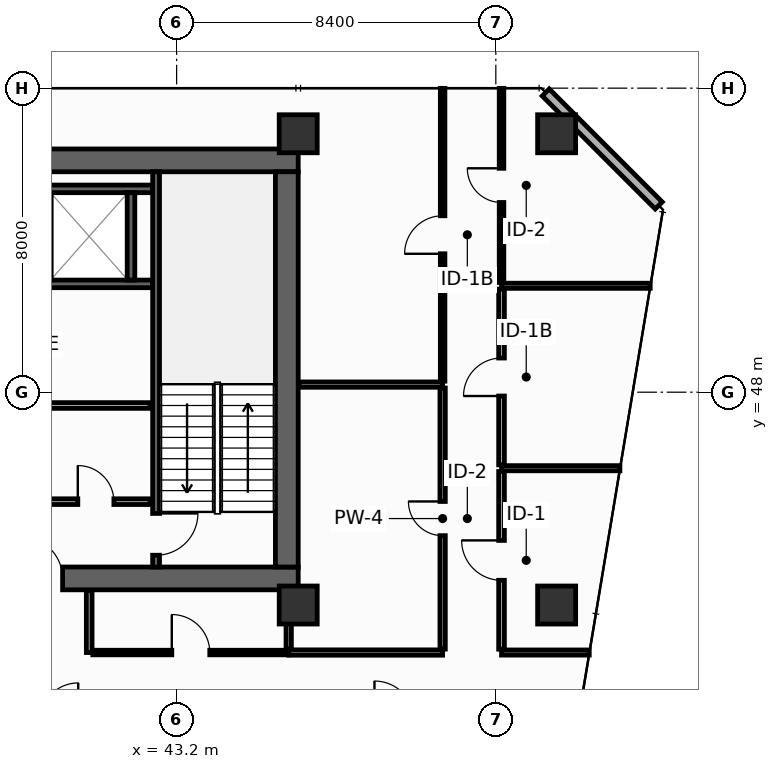
"""IFC4 building model, lengths in metres.
Left out: names, types, materials, properties, quantities, classifications, styles, units other than length and angle.
Written with IfcOpenShell. Run it as: python <this file> out.ifc"""

import sys

from ifc_helpers import new_model, si_unit, direction, frame, frame_2d, origin, origin_2d, place, context, subcontext, project, spatial, rectangle, hollow_rectangle, extrude, element, fill, save


model = new_model("IFC4")
c1 = context("Model", 3, precision=1e-05, world=origin(), true_north=direction((0.0, 1.0)))
c2 = subcontext(c1, "Body", "Model", "MODEL_VIEW")
j1 = project(units=[si_unit("LENGTHUNIT", "METRE"), si_unit("PLANEANGLEUNIT", "RADIAN")], contexts=[c1])
p1 = place(None, origin())
s1 = spatial("IfcSite", under=j1, at=p1, CompositionType="ELEMENT")
p2 = place(p1, origin())
s2 = spatial("IfcBuilding", under=s1, at=p2, CompositionType="ELEMENT")
p3 = place(p2, frame((0.0, 0.0, 110.4)))
s3 = spatial("IfcBuildingStorey", under=s2, at=p3, CompositionType="ELEMENT", Elevation=110.4)
p4 = place(p3, frame((13.5, 43.1, 0.0), z_axis=(0.0, 0.0, 1.0), x_axis=(1.0, 0.0, 0.0)))
e1 = element("IfcWall", 1, at=p4, inside=s3, PredefinedType="SHEAR", context=c2, shape_type="SweptSolid", body=[
    extrude(rectangle(XDim=32.9, YDim=0.6, at=frame_2d((16.45, 0.0))), origin(), (0.0, 0.0, 1.0), 4.15),
])
p5 = place(p4, frame((5.4, 0.0, 0.0)))
e2 = element("IfcOpeningElement", 2, at=p5, cuts=e1, PredefinedType="OPENING", context=c2, shape_type="SweptSolid", body=[
    extrude(rectangle(XDim=1.1, YDim=2.15, at=frame_2d((0.55, 1.075))), frame((0.0, 0.31, 0.0), z_axis=(0.0, -1.0, 0.0), x_axis=(1.0, 0.0, 0.0)), (0.0, 0.0, 1.0), 0.62),
])
p6 = place(p4, frame((25.6, 0.0, 0.0)))
e3 = element("IfcOpeningElement", 3, at=p6, cuts=e1, PredefinedType="OPENING", context=c2, shape_type="SweptSolid", body=[
    extrude(rectangle(XDim=1.1, YDim=2.15, at=frame_2d((0.55, 1.075))), frame((0.0, 0.31, 0.0), z_axis=(0.0, -1.0, 0.0), x_axis=(1.0, 0.0, 0.0)), (0.0, 0.0, 1.0), 0.62),
])
p7 = place(p3, frame((13.5, 54.1, 0.0), z_axis=(0.0, 0.0, 1.0), x_axis=(1.0, 0.0, 0.0)))
e4 = element("IfcWall", 4, at=p7, inside=s3, PredefinedType="SHEAR", context=c2, shape_type="SweptSolid", body=[
    extrude(rectangle(XDim=32.9, YDim=0.6, at=frame_2d((16.45, 0.0))), origin(), (0.0, 0.0, 1.0), 4.15),
])
p8 = place(p3, frame((46.1, 43.4, 0.0), z_axis=(0.0, 0.0, 1.0), x_axis=(0.0, 1.0, 0.0)))
e5 = element("IfcWall", 5, at=p8, inside=s3, PredefinedType="SHEAR", context=c2, shape_type="SweptSolid", body=[
    extrude(rectangle(XDim=10.4, YDim=0.6, at=frame_2d((5.2, 0.0))), origin(), (0.0, 0.0, 1.0), 4.15),
])
for number, where, z_axis, x_axis in (
    (6, (46.4, 54.8, 0.0), (0.0, 0.0, 1.0), (1.0, 0.0, 0.0)),
    (7, (53.2, 54.8, 0.0), (0.0, 0.0, 1.0), (1.0, 0.0, 0.0)),
    (8, (46.4, 42.4, 0.0), (0.0, 0.0, 1.0), (1.0, 0.0, 0.0)),
    (9, (53.2, 42.4, 0.0), (0.0, 0.0, 1.0), (1.0, 0.0, 0.0)),
):
    element("IfcColumn", number, at=place(p3, frame(where, z_axis=z_axis, x_axis=x_axis)), inside=s3, PredefinedType="COLUMN", context=c2, shape_type="SweptSolid", body=[
        extrude(hollow_rectangle(XDim=1.0, YDim=1.0, WallThickness=0.045, at=origin_2d()), origin(), (0.0, 0.0, 1.0), 4.4),
    ])
for number, where, z_axis, x_axis in (
    (10, (39.525, 50.85, 0.0), (0.0, 0.0, 1.0), (1.0, 0.0, 0.0)),
    (11, (39.525, 53.35, 0.0), (0.0, 0.0, 1.0), (1.0, 0.0, 0.0)),
):
    element("IfcWall", number, at=place(p3, frame(where, z_axis=z_axis, x_axis=x_axis)), inside=s3, PredefinedType="SHEAR", context=c2, shape_type="SweptSolid", body=[
        extrude(rectangle(XDim=3.045, YDim=0.2, at=frame_2d((1.522, 0.0))), origin(), (0.0, 0.0, 1.0), 4.15),
    ])
p9 = place(p3, frame((42.0, 50.95, 0.0), z_axis=(0.0, 0.0, 1.0), x_axis=(0.0, 1.0, 0.0)))
e12 = element("IfcWall", 12, at=p9, inside=s3, PredefinedType="SHEAR", context=c2, shape_type="SweptSolid", body=[
    extrude(rectangle(XDim=2.3, YDim=0.2, at=frame_2d((1.15, 0.0))), origin(), (0.0, 0.0, 1.0), 4.15),
])
p10 = place(p3, frame((42.66, 53.8, 0.0), z_axis=(0.0, 0.0, 1.0), x_axis=(0.0, -1.0, 0.0)))
e13 = element("IfcWall", 13, at=p10, inside=s3, PredefinedType="SHEAR", context=c2, shape_type="SweptSolid", body=[
    extrude(rectangle(XDim=10.4, YDim=0.18, at=frame_2d((5.2, 0.0))), origin(), (0.0, 0.0, 1.0), 4.15),
])
p11 = place(p10, frame((8.99, 0.0, 0.0)))
e14 = element("IfcOpeningElement", 14, at=p11, cuts=e13, PredefinedType="OPENING", context=c2, shape_type="SweptSolid", body=[
    extrude(rectangle(XDim=1.1, YDim=2.15, at=frame_2d((0.55, 1.075))), frame((0.0, 0.1, 0.0), z_axis=(0.0, -1.0, 0.0), x_axis=(1.0, 0.0, 0.0)), (0.0, 0.0, 1.0), 0.2),
])
p12 = place(p3, frame((33.95, 45.12, 0.0), z_axis=(0.0, 0.0, 1.0), x_axis=(1.0, 0.0, 0.0)))
e15 = element("IfcWall", 15, at=p12, inside=s3, PredefinedType="PARTITIONING", context=c2, shape_type="SweptSolid", body=[
    extrude(rectangle(XDim=8.55, YDim=0.15, at=frame_2d((4.275, 0.0))), origin(), (0.0, 0.0, 1.0), 4.15),
])
p13 = place(p12, frame((0.95, 0.0, 0.0)))
e16 = element("IfcOpeningElement", 16, at=p13, cuts=e15, PredefinedType="OPENING", context=c2, shape_type="SweptSolid", body=[
    extrude(rectangle(XDim=0.95, YDim=2.15, at=frame_2d((0.475, 1.075))), frame((0.0, 0.085, 0.0), z_axis=(0.0, -1.0, 0.0), x_axis=(1.0, 0.0, 0.0)), (0.0, 0.0, 1.0), 0.17),
])
p14 = place(p12, frame((3.8, 0.0, 0.0)))
e17 = element("IfcOpeningElement", 17, at=p14, cuts=e15, PredefinedType="OPENING", context=c2, shape_type="SweptSolid", body=[
    extrude(rectangle(XDim=0.95, YDim=2.15, at=frame_2d((0.475, 1.075))), frame((0.0, 0.085, 0.0), z_axis=(0.0, -1.0, 0.0), x_axis=(1.0, 0.0, 0.0)), (0.0, 0.0, 1.0), 0.17),
])
p15 = place(p12, frame((6.65, 0.0, 0.0)))
e18 = element("IfcOpeningElement", 18, at=p15, cuts=e15, PredefinedType="OPENING", context=c2, shape_type="SweptSolid", body=[
    extrude(rectangle(XDim=0.95, YDim=2.15, at=frame_2d((0.475, 1.075))), frame((0.0, 0.085, 0.0), z_axis=(0.0, -1.0, 0.0), x_axis=(1.0, 0.0, 0.0)), (0.0, 0.0, 1.0), 0.17),
])
p16 = place(p3, frame((33.95, 47.65, 0.0), z_axis=(0.0, 0.0, 1.0), x_axis=(1.0, 0.0, 0.0)))
e19 = element("IfcWall", 19, at=p16, inside=s3, PredefinedType="PARTITIONING", context=c2, shape_type="SweptSolid", body=[
    extrude(rectangle(XDim=8.55, YDim=0.15, at=frame_2d((4.275, 0.0))), origin(), (0.0, 0.0, 1.0), 4.15),
])
p17 = place(p3, frame((55.887, 52.913, 0.0), z_axis=(0.0, 0.0, 1.0), x_axis=(-0.707106781187, 0.707106781187, 0.0)))
e20 = element("IfcWall", 20, at=p17, inside=s3, PredefinedType="STANDARD", context=c2, shape_type="SweptSolid", body=[
    extrude(rectangle(XDim=4.206, YDim=0.26, at=frame_2d((2.103, 0.0))), origin(), (0.0, 0.0, 1.0), 4.15),
])
p18 = place(p3, frame((46.15, 41.15, 0.0), z_axis=(0.0, 0.0, 1.0), x_axis=(1.0, 0.0, 0.0)))
e21 = element("IfcWall", 21, at=p18, inside=s3, PredefinedType="PARTITIONING", context=c2, shape_type="SweptSolid", body=[
    extrude(rectangle(XDim=4.05, YDim=0.14, at=frame_2d((2.025, 0.0))), origin(), (0.0, 0.0, 1.0), 4.15),
])
p19 = place(p3, frame((46.15, 41.24, 0.0), z_axis=(0.0, 0.0, 1.0), x_axis=(0.0, 1.0, 0.0)))
e22 = element("IfcWall", 22, at=p19, inside=s3, PredefinedType="PARTITIONING", context=c2, shape_type="SweptSolid", body=[
    extrude(rectangle(XDim=1.54, YDim=0.14, at=frame_2d((0.77, 0.0))), origin(), (0.0, 0.0, 1.0), 4.15),
])
p20 = place(p3, frame((46.42, 48.2, 0.0), z_axis=(0.0, 0.0, 1.0), x_axis=(1.0, 0.0, 0.0)))
e23 = element("IfcWall", 23, at=p20, inside=s3, PredefinedType="PARTITIONING", context=c2, shape_type="SweptSolid", body=[
    extrude(rectangle(XDim=3.78, YDim=0.14, at=frame_2d((1.89, 0.0))), origin(), (0.0, 0.0, 1.0), 4.15),
])
p21 = place(p3, frame((50.2, 41.24, 0.0), z_axis=(0.0, 0.0, 1.0), x_axis=(0.0, 1.0, 0.0)))
e24 = element("IfcWall", 24, at=p21, inside=s3, PredefinedType="PARTITIONING", context=c2, shape_type="SweptSolid", body=[
    extrude(rectangle(XDim=6.87, YDim=0.14, at=frame_2d((3.435, 0.0))), origin(), (0.0, 0.0, 1.0), 3.335),
])
p22 = place(p21, frame((2.985, 0.0, 0.0)))
e25 = element("IfcOpeningElement", 25, at=p22, cuts=e24, PredefinedType="OPENING", context=c2, shape_type="SweptSolid", body=[
    extrude(rectangle(XDim=0.9, YDim=2.1, at=frame_2d((0.45, 1.05))), frame((0.0, 0.08, 0.0), z_axis=(0.0, -1.0, 0.0), x_axis=(1.0, 0.0, 0.0)), (0.0, 0.0, 1.0), 0.16),
])
p23 = place(p3, frame((50.2, 48.29, 0.0), z_axis=(0.0, 0.0, 1.0), x_axis=(0.0, 1.0, 0.0)))
e26 = element("IfcWall", 26, at=p23, inside=s3, PredefinedType="PARTITIONING", context=c2, shape_type="SweptSolid", body=[
    extrude(rectangle(XDim=7.705, YDim=0.12, at=frame_2d((3.853, 0.0))), origin(), (0.0, 0.0, 1.0), 3.435),
])
p24 = place(p23, frame((3.352, 0.0, 0.0)))
e27 = element("IfcOpeningElement", 27, at=p24, cuts=e26, PredefinedType="OPENING", context=c2, shape_type="SweptSolid", body=[
    extrude(rectangle(XDim=1.0, YDim=2.15, at=frame_2d((0.5, 1.075))), frame((0.0, 0.07, 0.0), z_axis=(0.0, -1.0, 0.0), x_axis=(1.0, 0.0, 0.0)), (0.0, 0.0, 1.0), 0.14),
])
p25 = place(p3, frame((51.75, 41.15, 0.0), z_axis=(0.0, 0.0, 1.0), x_axis=(1.0, 0.0, 0.0)))
e28 = element("IfcWall", 28, at=p25, inside=s3, PredefinedType="PARTITIONING", context=c2, shape_type="SweptSolid", body=[
    extrude(rectangle(XDim=2.308, YDim=0.135, at=frame_2d((1.154, 0.0))), origin(), (0.0, 0.0, 1.0), 3.635),
])
p26 = place(p3, frame((51.75, 46.0, 0.0), z_axis=(0.0, 0.0, 1.0), x_axis=(1.0, 0.0, 0.0)))
e29 = element("IfcWall", 29, at=p26, inside=s3, PredefinedType="PARTITIONING", context=c2, shape_type="SweptSolid", body=[
    extrude(rectangle(XDim=3.115, YDim=0.135, at=frame_2d((1.557, 0.0))), origin(), (0.0, 0.0, 1.0), 3.335),
])
p27 = place(p3, frame((51.75, 50.8, 0.0), z_axis=(0.0, 0.0, 1.0), x_axis=(1.0, 0.0, 0.0)))
e30 = element("IfcWall", 30, at=p27, inside=s3, PredefinedType="PARTITIONING", context=c2, shape_type="SweptSolid", body=[
    extrude(rectangle(XDim=3.912, YDim=0.135, at=frame_2d((1.956, 0.0))), origin(), (0.0, 0.0, 1.0), 3.335),
])
p28 = place(p3, frame((51.75, 41.238, 0.0), z_axis=(0.0, 0.0, 1.0), x_axis=(0.0, 1.0, 0.0)))
e31 = element("IfcWall", 31, at=p28, inside=s3, PredefinedType="PARTITIONING", context=c2, shape_type="SweptSolid", body=[
    extrude(rectangle(XDim=4.675, YDim=0.15, at=frame_2d((2.337, 0.0))), origin(), (0.0, 0.0, 1.0), 3.335),
])
p29 = place(p28, frame((1.813, 0.0, 0.0)))
e32 = element("IfcOpeningElement", 32, at=p29, cuts=e31, PredefinedType="OPENING", context=c2, shape_type="SweptSolid", body=[
    extrude(rectangle(XDim=1.05, YDim=2.15, at=frame_2d((0.525, 1.075))), frame((0.0, 0.085, 0.0), z_axis=(0.0, -1.0, 0.0), x_axis=(1.0, 0.0, 0.0)), (0.0, 0.0, 1.0), 0.17),
])
p30 = place(p3, frame((51.75, 46.087, 0.0), z_axis=(0.0, 0.0, 1.0), x_axis=(0.0, 1.0, 0.0)))
e33 = element("IfcWall", 33, at=p30, inside=s3, PredefinedType="PARTITIONING", context=c2, shape_type="SweptSolid", body=[
    extrude(rectangle(XDim=4.625, YDim=0.15, at=frame_2d((2.312, 0.0))), origin(), (0.0, 0.0, 1.0), 4.15),
])
p31 = place(p30, frame((1.812, 0.0, 0.0)))
e34 = element("IfcOpeningElement", 34, at=p31, cuts=e33, PredefinedType="OPENING", context=c2, shape_type="SweptSolid", body=[
    extrude(rectangle(XDim=1.0, YDim=2.15, at=frame_2d((0.5, 1.075))), frame((0.0, 0.085, 0.0), z_axis=(0.0, -1.0, 0.0), x_axis=(1.0, 0.0, 0.0)), (0.0, 0.0, 1.0), 0.17),
])
p32 = place(p3, frame((51.75, 50.887, 0.0), z_axis=(0.0, 0.0, 1.0), x_axis=(0.0, 1.0, 0.0)))
e35 = element("IfcWall", 35, at=p32, inside=s3, PredefinedType="PARTITIONING", context=c2, shape_type="SweptSolid", body=[
    extrude(rectangle(XDim=5.108, YDim=0.12, at=frame_2d((2.554, 0.0))), origin(), (0.0, 0.0, 1.0), 3.435),
])
p33 = place(p32, frame((2.104, 0.0, 0.0)))
e36 = element("IfcOpeningElement", 36, at=p33, cuts=e35, PredefinedType="OPENING", context=c2, shape_type="SweptSolid", body=[
    extrude(rectangle(XDim=0.9, YDim=2.1, at=frame_2d((0.45, 1.05))), frame((0.0, 0.07, 0.0), z_axis=(0.0, -1.0, 0.0), x_axis=(1.0, 0.0, 0.0)), (0.0, 0.0, 1.0), 0.14),
])
p34 = place(p3, frame((40.9, 41.15, 0.0), z_axis=(0.0, 0.0, 1.0), x_axis=(0.0, 1.0, 0.0)))
e37 = element("IfcWall", 37, at=p34, inside=s3, PredefinedType="PARTITIONING", context=c2, shape_type="SweptSolid", body=[
    extrude(rectangle(XDim=1.63, YDim=0.15, at=frame_2d((0.815, 0.0))), origin(), (0.0, 0.0, 1.0), 4.15),
])
p35 = place(p3, frame((40.995, 41.15, 0.0), z_axis=(0.0, 0.0, 1.0), x_axis=(1.0, 0.0, 0.0)))
e38 = element("IfcWall", 38, at=p35, inside=s3, PredefinedType="PARTITIONING", context=c2, shape_type="SweptSolid", body=[
    extrude(rectangle(XDim=5.155, YDim=0.12, at=frame_2d((2.577, 0.0))), origin(), (0.0, 0.0, 1.0), 4.15),
])
p36 = place(p35, frame((2.078, 0.0, 0.0)))
e39 = element("IfcOpeningElement", 39, at=p36, cuts=e38, PredefinedType="OPENING", context=c2, shape_type="SweptSolid", body=[
    extrude(rectangle(XDim=1.0, YDim=2.15, at=frame_2d((0.5, 1.075))), frame((0.0, 0.07, 0.0), z_axis=(0.0, -1.0, 0.0), x_axis=(1.0, 0.0, 0.0)), (0.0, 0.0, 1.0), 0.14),
])
p37 = place(p11, origin())
e40 = element("IfcDoor", 40, at=p37, inside=s3, OperationType="SINGLE_SWING_LEFT", PredefinedType="DOOR", context=c2, shape_type="SweptSolid", body=[
    extrude(rectangle(XDim=1.1, YDim=2.15, at=frame_2d((0.55, 1.075))), frame((0.0, 0.025, 0.0), z_axis=(0.0, -1.0, 0.0), x_axis=(1.0, 0.0, 0.0)), (0.0, 0.0, 1.0), 0.05),
])
fill(e14, e40)
p38 = place(p6, origin())
e41 = element("IfcDoor", 41, at=p38, inside=s3, OperationType="SINGLE_SWING_LEFT", PredefinedType="DOOR", context=c2, shape_type="SweptSolid", body=[
    extrude(rectangle(XDim=1.1, YDim=2.15, at=frame_2d((0.55, 1.075))), frame((0.0, 0.025, 0.0), z_axis=(0.0, -1.0, 0.0), x_axis=(1.0, 0.0, 0.0)), (0.0, 0.0, 1.0), 0.05),
])
fill(e3, e41)
p39 = place(p15, origin())
e42 = element("IfcDoor", 42, at=p39, inside=s3, OperationType="SINGLE_SWING_LEFT", PredefinedType="DOOR", context=c2, shape_type="SweptSolid", body=[
    extrude(rectangle(XDim=0.95, YDim=2.15, at=frame_2d((0.475, 1.075))), frame((0.0, 0.025, 0.0), z_axis=(0.0, -1.0, 0.0), x_axis=(1.0, 0.0, 0.0)), (0.0, 0.0, 1.0), 0.05),
])
fill(e18, e42)
p40 = place(p22, origin())
e43 = element("IfcDoor", 43, at=p40, inside=s3, OperationType="SINGLE_SWING_RIGHT", PredefinedType="DOOR", context=c2, shape_type="SweptSolid", body=[
    extrude(rectangle(XDim=0.9, YDim=2.1, at=frame_2d((0.45, 1.05))), frame((0.0, 0.025, 0.0), z_axis=(0.0, -1.0, 0.0), x_axis=(1.0, 0.0, 0.0)), (0.0, 0.0, 1.0), 0.05),
])
fill(e25, e43)
p41 = place(p24, origin())
e44 = element("IfcDoor", 44, at=p41, inside=s3, OperationType="SINGLE_SWING_LEFT", PredefinedType="DOOR", context=c2, shape_type="SweptSolid", body=[
    extrude(rectangle(XDim=1.0, YDim=2.15, at=frame_2d((0.5, 1.075))), frame((0.0, 0.025, 0.0), z_axis=(0.0, -1.0, 0.0), x_axis=(1.0, 0.0, 0.0)), (0.0, 0.0, 1.0), 0.05),
])
fill(e27, e44)
p42 = place(p29, origin())
e45 = element("IfcDoor", 45, at=p42, inside=s3, OperationType="SINGLE_SWING_RIGHT", PredefinedType="DOOR", context=c2, shape_type="SweptSolid", body=[
    extrude(rectangle(XDim=1.05, YDim=2.15, at=frame_2d((0.525, 1.075))), frame((0.0, 0.025, 0.0), z_axis=(0.0, -1.0, 0.0), x_axis=(1.0, 0.0, 0.0)), (0.0, 0.0, 1.0), 0.05),
])
fill(e32, e45)
p43 = place(p31, origin())
e46 = element("IfcDoor", 46, at=p43, inside=s3, OperationType="SINGLE_SWING_LEFT", PredefinedType="DOOR", context=c2, shape_type="SweptSolid", body=[
    extrude(rectangle(XDim=1.0, YDim=2.15, at=frame_2d((0.5, 1.075))), frame((0.0, 0.025, 0.0), z_axis=(0.0, -1.0, 0.0), x_axis=(1.0, 0.0, 0.0)), (0.0, 0.0, 1.0), 0.05),
])
fill(e34, e46)
p44 = place(p33, origin())
e47 = element("IfcDoor", 47, at=p44, inside=s3, OperationType="SINGLE_SWING_RIGHT", PredefinedType="DOOR", context=c2, shape_type="SweptSolid", body=[
    extrude(rectangle(XDim=0.9, YDim=2.1, at=frame_2d((0.45, 1.05))), frame((0.0, 0.025, 0.0), z_axis=(0.0, -1.0, 0.0), x_axis=(1.0, 0.0, 0.0)), (0.0, 0.0, 1.0), 0.05),
])
fill(e36, e47)
p45 = place(p36, origin())
e48 = element("IfcDoor", 48, at=p45, inside=s3, OperationType="SINGLE_SWING_LEFT", PredefinedType="DOOR", context=c2, shape_type="SweptSolid", body=[
    extrude(rectangle(XDim=1.0, YDim=2.15, at=frame_2d((0.5, 1.075))), frame((0.0, 0.025, 0.0), z_axis=(0.0, -1.0, 0.0), x_axis=(1.0, 0.0, 0.0)), (0.0, 0.0, 1.0), 0.05),
])
fill(e39, e48)
save(model, sys.argv[1])
